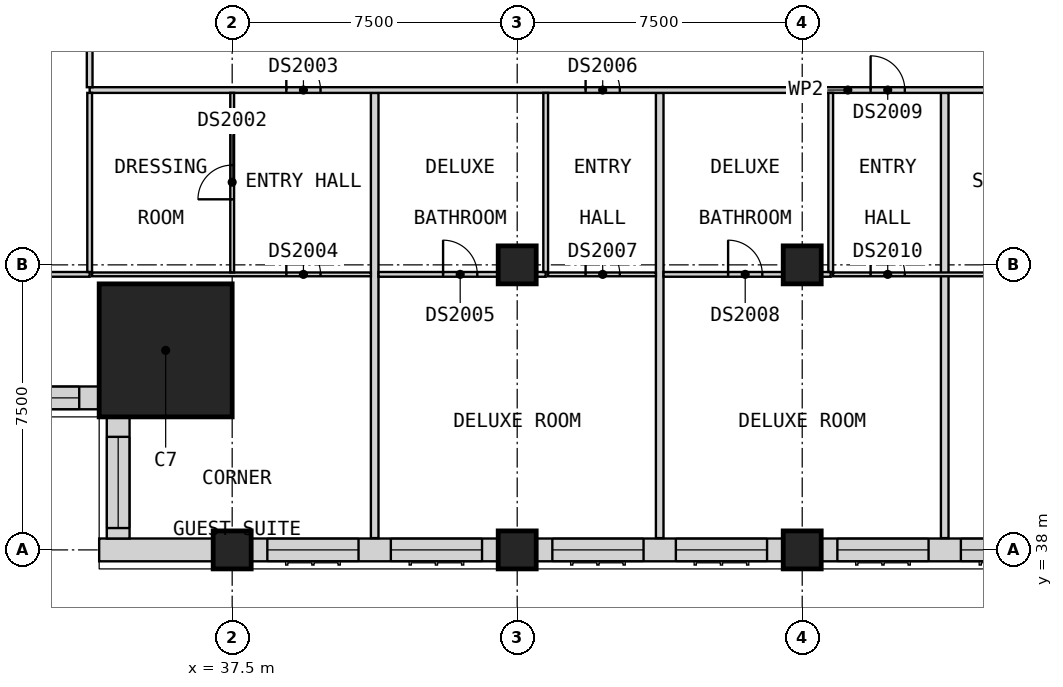
"""IFC4 building model, lengths in metres.
Left out: names, types, materials, properties, quantities, classifications, styles, units other than length and angle.
Written with IfcOpenShell. Run it as: python <this file> out.ifc"""

import sys

from ifc_helpers import new_model, si_unit, direction, frame, frame_2d, origin, origin_2d, place, context, subcontext, project, spatial, rectangle, extrude, element, fill, save


model = new_model("IFC4")
c1 = context("Model", 3, precision=1e-05, world=origin(), true_north=direction((0.0, 1.0)))
c2 = subcontext(c1, "Body", "Model", "MODEL_VIEW")
j1 = project(units=[si_unit("LENGTHUNIT", "METRE"), si_unit("PLANEANGLEUNIT", "RADIAN")], contexts=[c1])
p1 = place(None, origin())
s1 = spatial("IfcSite", under=j1, at=p1, CompositionType="ELEMENT")
p2 = place(p1, origin())
s2 = spatial("IfcBuilding", under=s1, at=p2, CompositionType="ELEMENT")
p3 = place(p2, frame((0.0, 0.0, 133.8)))
s3 = spatial("IfcBuildingStorey", under=s2, at=p3, CompositionType="ELEMENT", Elevation=133.8)
for number, where, z_axis, x_axis in (
    (1, (37.5, 38.0, 0.0), (0.0, 0.0, 1.0), (1.0, 0.0, 0.0)),
    (2, (45.0, 38.0, 0.0), (0.0, 0.0, 1.0), (1.0, 0.0, 0.0)),
    (3, (45.0, 45.5, 0.0), (0.0, 0.0, 1.0), (1.0, 0.0, 0.0)),
    (4, (52.5, 38.0, 0.0), (0.0, 0.0, 1.0), (1.0, 0.0, 0.0)),
    (5, (52.5, 45.5, 0.0), (0.0, 0.0, 1.0), (1.0, 0.0, 0.0)),
):
    element("IfcColumn", number, at=place(p3, frame(where, z_axis=z_axis, x_axis=x_axis)), inside=s3, PredefinedType="COLUMN", context=c2, shape_type="SweptSolid", body=[
        extrude(rectangle(XDim=1.0, YDim=1.0, at=origin_2d()), origin(), (0.0, 0.0, 1.0), 3.6),
    ])
p4 = place(p3, frame((35.75, 43.25, 0.0), z_axis=(0.0, 0.0, 1.0), x_axis=(1.0, 0.0, 0.0)))
e6 = element("IfcColumn", 6, at=p4, inside=s3, PredefinedType="COLUMN", context=c2, shape_type="SweptSolid", body=[
    extrude(rectangle(XDim=3.5, YDim=3.5, at=origin_2d()), origin(), (0.0, 0.0, 1.0), 3.6),
])
p5 = place(p3, frame((34.0, 38.0, 0.0), z_axis=(0.0, 0.0, 1.0), x_axis=(1.0, 0.0, 0.0)))
e7 = element("IfcWall", 7, at=p5, inside=s3, PredefinedType="SOLIDWALL", context=c2, shape_type="SweptSolid", body=[
    extrude(rectangle(XDim=3.0, YDim=0.6, at=frame_2d((1.5, 0.0))), origin(), (0.0, 0.0, 1.0), 3.35),
])
p6 = place(p3, frame((38.0, 38.0, 0.0), z_axis=(0.0, 0.0, 1.0), x_axis=(1.0, 0.0, 0.0)))
e8 = element("IfcWall", 8, at=p6, inside=s3, PredefinedType="SOLIDWALL", context=c2, shape_type="SweptSolid", body=[
    extrude(rectangle(XDim=6.5, YDim=0.6, at=frame_2d((3.25, 0.0))), origin(), (0.0, 0.0, 1.0), 2.85),
])
p7 = place(p6, frame((0.425, 0.0, 0.8)))
e9 = element("IfcOpeningElement", 9, at=p7, cuts=e8, PredefinedType="OPENING", context=c2, shape_type="SweptSolid", body=[
    extrude(rectangle(XDim=2.4, YDim=1.8, at=frame_2d((1.2, 0.9))), frame((0.0, 0.31, 0.0), z_axis=(0.0, -1.0, 0.0), x_axis=(1.0, 0.0, 0.0)), (0.0, 0.0, 1.0), 0.62),
])
p8 = place(p6, frame((3.675, 0.0, 0.8)))
e10 = element("IfcOpeningElement", 10, at=p8, cuts=e8, PredefinedType="OPENING", context=c2, shape_type="SweptSolid", body=[
    extrude(rectangle(XDim=2.4, YDim=1.8, at=frame_2d((1.2, 0.9))), frame((0.0, 0.31, 0.0), z_axis=(0.0, -1.0, 0.0), x_axis=(1.0, 0.0, 0.0)), (0.0, 0.0, 1.0), 0.62),
])
p9 = place(p3, frame((45.5, 38.0, 0.0), z_axis=(0.0, 0.0, 1.0), x_axis=(1.0, 0.0, 0.0)))
e11 = element("IfcWall", 11, at=p9, inside=s3, PredefinedType="SOLIDWALL", context=c2, shape_type="SweptSolid", body=[
    extrude(rectangle(XDim=6.5, YDim=0.6, at=frame_2d((3.25, 0.0))), origin(), (0.0, 0.0, 1.0), 2.85),
])
p10 = place(p9, frame((0.425, 0.0, 0.8)))
e12 = element("IfcOpeningElement", 12, at=p10, cuts=e11, PredefinedType="OPENING", context=c2, shape_type="SweptSolid", body=[
    extrude(rectangle(XDim=2.4, YDim=1.8, at=frame_2d((1.2, 0.9))), frame((0.0, 0.31, 0.0), z_axis=(0.0, -1.0, 0.0), x_axis=(1.0, 0.0, 0.0)), (0.0, 0.0, 1.0), 0.62),
])
p11 = place(p9, frame((3.675, 0.0, 0.8)))
e13 = element("IfcOpeningElement", 13, at=p11, cuts=e11, PredefinedType="OPENING", context=c2, shape_type="SweptSolid", body=[
    extrude(rectangle(XDim=2.4, YDim=1.8, at=frame_2d((1.2, 0.9))), frame((0.0, 0.31, 0.0), z_axis=(0.0, -1.0, 0.0), x_axis=(1.0, 0.0, 0.0)), (0.0, 0.0, 1.0), 0.62),
])
p12 = place(p3, frame((53.0, 38.0, 0.0), z_axis=(0.0, 0.0, 1.0), x_axis=(1.0, 0.0, 0.0)))
e14 = element("IfcWall", 14, at=p12, inside=s3, PredefinedType="SOLIDWALL", context=c2, shape_type="SweptSolid", body=[
    extrude(rectangle(XDim=6.5, YDim=0.6, at=frame_2d((3.25, 0.0))), origin(), (0.0, 0.0, 1.0), 2.85),
])
p13 = place(p12, frame((0.425, 0.0, 0.8)))
e15 = element("IfcOpeningElement", 15, at=p13, cuts=e14, PredefinedType="OPENING", context=c2, shape_type="SweptSolid", body=[
    extrude(rectangle(XDim=2.4, YDim=1.8, at=frame_2d((1.2, 0.9))), frame((0.0, 0.31, 0.0), z_axis=(0.0, -1.0, 0.0), x_axis=(1.0, 0.0, 0.0)), (0.0, 0.0, 1.0), 0.62),
])
p14 = place(p12, frame((3.675, 0.0, 0.8)))
e16 = element("IfcOpeningElement", 16, at=p14, cuts=e14, PredefinedType="OPENING", context=c2, shape_type="SweptSolid", body=[
    extrude(rectangle(XDim=2.4, YDim=1.8, at=frame_2d((1.2, 0.9))), frame((0.0, 0.31, 0.0), z_axis=(0.0, -1.0, 0.0), x_axis=(1.0, 0.0, 0.0)), (0.0, 0.0, 1.0), 0.62),
])
p15 = place(p3, frame((30.8, 42.0, 0.0), z_axis=(0.0, 0.0, 1.0), x_axis=(1.0, 0.0, 0.0)))
e17 = element("IfcWall", 17, at=p15, inside=s3, PredefinedType="SOLIDWALL", context=c2, shape_type="SweptSolid", body=[
    extrude(rectangle(XDim=3.2, YDim=0.6, at=frame_2d((1.6, 0.0))), origin(), (0.0, 0.0, 1.0), 3.35),
])
p16 = place(p15, frame((0.275, 0.0, 0.8)))
e18 = element("IfcOpeningElement", 18, at=p16, cuts=e17, PredefinedType="OPENING", context=c2, shape_type="SweptSolid", body=[
    extrude(rectangle(XDim=2.4, YDim=1.8, at=frame_2d((1.2, 0.9))), frame((0.0, 0.31, 0.0), z_axis=(0.0, -1.0, 0.0), x_axis=(1.0, 0.0, 0.0)), (0.0, 0.0, 1.0), 0.62),
])
p17 = place(p3, frame((34.5, 41.5, 0.0), z_axis=(0.0, 0.0, 1.0), x_axis=(0.0, -1.0, 0.0)))
e19 = element("IfcWall", 19, at=p17, inside=s3, PredefinedType="SOLIDWALL", context=c2, shape_type="SweptSolid", body=[
    extrude(rectangle(XDim=3.2, YDim=0.6, at=frame_2d((1.6, 0.0))), origin(), (0.0, 0.0, 1.0), 3.35),
])
p18 = place(p17, frame((0.525, 0.0, 0.8)))
e20 = element("IfcOpeningElement", 20, at=p18, cuts=e19, PredefinedType="OPENING", context=c2, shape_type="SweptSolid", body=[
    extrude(rectangle(XDim=2.4, YDim=1.8, at=frame_2d((1.2, 0.9))), frame((0.0, 0.31, 0.0), z_axis=(0.0, -1.0, 0.0), x_axis=(1.0, 0.0, 0.0)), (0.0, 0.0, 1.0), 0.62),
])
for number, where, z_axis, x_axis in (
    (21, (41.25, 38.31, 0.0), (0.0, 0.0, 1.0), (0.0, 1.0, 0.0)),
    (22, (48.75, 38.31, 0.0), (0.0, 0.0, 1.0), (0.0, 1.0, 0.0)),
    (23, (56.25, 38.31, 0.0), (0.0, 0.0, 1.0), (0.0, 1.0, 0.0)),
):
    element("IfcWall", number, at=place(p3, frame(where, z_axis=z_axis, x_axis=x_axis)), inside=s3, PredefinedType="PARTITIONING", context=c2, shape_type="SweptSolid", body=[
        extrude(rectangle(XDim=11.715, YDim=0.2, at=frame_2d((5.857, 0.0))), origin(), (0.0, 0.0, 1.0), 3.35),
    ])
p19 = place(p3, frame((33.75, 50.1, 0.0), z_axis=(0.0, 0.0, 1.0), x_axis=(1.0, 0.0, 0.0)))
e24 = element("IfcWall", 24, at=p19, inside=s3, PredefinedType="PARTITIONING", context=c2, shape_type="SweptSolid", body=[
    extrude(rectangle(XDim=39.9, YDim=0.15, at=frame_2d((19.95, 0.0))), origin(), (0.0, 0.0, 1.0), 3.35),
])
p20 = place(p19, frame((5.175, 0.0, 0.0)))
e25 = element("IfcOpeningElement", 25, at=p20, cuts=e24, PredefinedType="OPENING", context=c2, shape_type="SweptSolid", body=[
    extrude(rectangle(XDim=0.9, YDim=2.1, at=frame_2d((0.45, 1.05))), frame((0.0, 0.085, 0.0), z_axis=(0.0, -1.0, 0.0), x_axis=(1.0, 0.0, 0.0)), (0.0, 0.0, 1.0), 0.17),
])
p21 = place(p19, frame((13.05, 0.0, 0.0)))
e26 = element("IfcOpeningElement", 26, at=p21, cuts=e24, PredefinedType="OPENING", context=c2, shape_type="SweptSolid", body=[
    extrude(rectangle(XDim=0.9, YDim=2.1, at=frame_2d((0.45, 1.05))), frame((0.0, 0.085, 0.0), z_axis=(0.0, -1.0, 0.0), x_axis=(1.0, 0.0, 0.0)), (0.0, 0.0, 1.0), 0.17),
])
p22 = place(p19, frame((20.55, 0.0, 0.0)))
e27 = element("IfcOpeningElement", 27, at=p22, cuts=e24, PredefinedType="OPENING", context=c2, shape_type="SweptSolid", body=[
    extrude(rectangle(XDim=0.9, YDim=2.1, at=frame_2d((0.45, 1.05))), frame((0.0, 0.085, 0.0), z_axis=(0.0, -1.0, 0.0), x_axis=(1.0, 0.0, 0.0)), (0.0, 0.0, 1.0), 0.17),
])
p23 = place(p19, frame((24.3, 0.0, 0.0)))
e28 = element("IfcOpeningElement", 28, at=p23, cuts=e24, PredefinedType="OPENING", context=c2, shape_type="SweptSolid", body=[
    extrude(rectangle(XDim=0.9, YDim=2.1, at=frame_2d((0.45, 1.05))), frame((0.0, 0.085, 0.0), z_axis=(0.0, -1.0, 0.0), x_axis=(1.0, 0.0, 0.0)), (0.0, 0.0, 1.0), 0.17),
])
p24 = place(p19, frame((36.113, 0.0, 0.0)))
e29 = element("IfcOpeningElement", 29, at=p24, cuts=e24, PredefinedType="OPENING", context=c2, shape_type="SweptSolid", body=[
    extrude(rectangle(XDim=0.9, YDim=2.1, at=frame_2d((0.45, 1.05))), frame((0.0, 0.085, 0.0), z_axis=(0.0, -1.0, 0.0), x_axis=(1.0, 0.0, 0.0)), (0.0, 0.0, 1.0), 0.17),
])
p25 = place(p19, frame((38.25, 0.0, 0.0)))
e30 = element("IfcOpeningElement", 30, at=p25, cuts=e24, PredefinedType="OPENING", context=c2, shape_type="SweptSolid", body=[
    extrude(rectangle(XDim=0.9, YDim=2.1, at=frame_2d((0.45, 1.05))), frame((0.0, 0.085, 0.0), z_axis=(0.0, -1.0, 0.0), x_axis=(1.0, 0.0, 0.0)), (0.0, 0.0, 1.0), 0.17),
])
p26 = place(p3, frame((33.75, 50.175, 0.0), z_axis=(0.0, 0.0, 1.0), x_axis=(0.0, 1.0, 0.0)))
e31 = element("IfcWall", 31, at=p26, inside=s3, PredefinedType="PARTITIONING", context=c2, shape_type="SweptSolid", body=[
    extrude(rectangle(XDim=2.225, YDim=0.15, at=frame_2d((1.112, 0.0))), origin(), (0.0, 0.0, 1.0), 3.35),
])
p27 = place(p3, frame((33.812, 45.25, 0.0), z_axis=(0.0, 0.0, 1.0), x_axis=(1.0, 0.0, 0.0)))
e32 = element("IfcWall", 32, at=p27, inside=s3, PredefinedType="PARTITIONING", context=c2, shape_type="SweptSolid", body=[
    extrude(rectangle(XDim=7.337, YDim=0.1, at=frame_2d((3.669, 0.0))), origin(), (0.0, 0.0, 1.0), 3.35),
])
p28 = place(p27, frame((5.113, 0.0, 0.0)))
e33 = element("IfcOpeningElement", 33, at=p28, cuts=e32, PredefinedType="OPENING", context=c2, shape_type="SweptSolid", body=[
    extrude(rectangle(XDim=0.9, YDim=2.1, at=frame_2d((0.45, 1.05))), frame((0.0, 0.06, 0.0), z_axis=(0.0, -1.0, 0.0), x_axis=(1.0, 0.0, 0.0)), (0.0, 0.0, 1.0), 0.12),
])
p29 = place(p3, frame((45.812, 45.25, 0.0), z_axis=(0.0, 0.0, 1.0), x_axis=(1.0, 0.0, 0.0)))
e34 = element("IfcWall", 34, at=p29, inside=s3, PredefinedType="PARTITIONING", context=c2, shape_type="SweptSolid", body=[
    extrude(rectangle(XDim=2.837, YDim=0.1, at=frame_2d((1.419, 0.0))), origin(), (0.0, 0.0, 1.0), 3.35),
])
p30 = place(p29, frame((0.988, 0.0, 0.0)))
e35 = element("IfcOpeningElement", 35, at=p30, cuts=e34, PredefinedType="OPENING", context=c2, shape_type="SweptSolid", body=[
    extrude(rectangle(XDim=0.9, YDim=2.1, at=frame_2d((0.45, 1.05))), frame((0.0, 0.06, 0.0), z_axis=(0.0, -1.0, 0.0), x_axis=(1.0, 0.0, 0.0)), (0.0, 0.0, 1.0), 0.12),
])
p31 = place(p3, frame((53.312, 45.25, 0.0), z_axis=(0.0, 0.0, 1.0), x_axis=(1.0, 0.0, 0.0)))
e36 = element("IfcWall", 36, at=p31, inside=s3, PredefinedType="PARTITIONING", context=c2, shape_type="SweptSolid", body=[
    extrude(rectangle(XDim=7.375, YDim=0.1, at=frame_2d((3.688, 0.0))), origin(), (0.0, 0.0, 1.0), 3.35),
])
p32 = place(p31, frame((0.988, 0.0, 0.0)))
e37 = element("IfcOpeningElement", 37, at=p32, cuts=e36, PredefinedType="OPENING", context=c2, shape_type="SweptSolid", body=[
    extrude(rectangle(XDim=0.9, YDim=2.1, at=frame_2d((0.45, 1.05))), frame((0.0, 0.06, 0.0), z_axis=(0.0, -1.0, 0.0), x_axis=(1.0, 0.0, 0.0)), (0.0, 0.0, 1.0), 0.12),
])
p33 = place(p31, frame((4.738, 0.0, 0.0)))
e38 = element("IfcOpeningElement", 38, at=p33, cuts=e36, PredefinedType="OPENING", context=c2, shape_type="SweptSolid", body=[
    extrude(rectangle(XDim=0.9, YDim=2.1, at=frame_2d((0.45, 1.05))), frame((0.0, 0.06, 0.0), z_axis=(0.0, -1.0, 0.0), x_axis=(1.0, 0.0, 0.0)), (0.0, 0.0, 1.0), 0.12),
])
p34 = place(p3, frame((37.5, 45.3, 0.0), z_axis=(0.0, 0.0, 1.0), x_axis=(0.0, 1.0, 0.0)))
e39 = element("IfcWall", 39, at=p34, inside=s3, PredefinedType="PARTITIONING", context=c2, shape_type="SweptSolid", body=[
    extrude(rectangle(XDim=4.725, YDim=0.1, at=frame_2d((2.362, 0.0))), origin(), (0.0, 0.0, 1.0), 3.35),
])
p35 = place(p34, frame((1.925, 0.0, 0.0)))
e40 = element("IfcOpeningElement", 40, at=p35, cuts=e39, PredefinedType="OPENING", context=c2, shape_type="SweptSolid", body=[
    extrude(rectangle(XDim=0.9, YDim=2.1, at=frame_2d((0.45, 1.05))), frame((0.0, 0.06, 0.0), z_axis=(0.0, -1.0, 0.0), x_axis=(1.0, 0.0, 0.0)), (0.0, 0.0, 1.0), 0.12),
])
p36 = place(p3, frame((30.0, 45.25, 0.0), z_axis=(0.0, 0.0, 1.0), x_axis=(1.0, 0.0, 0.0)))
e41 = element("IfcWall", 41, at=p36, inside=s3, PredefinedType="PARTITIONING", context=c2, shape_type="SweptSolid", body=[
    extrude(rectangle(XDim=3.75, YDim=0.125, at=frame_2d((1.875, 0.0))), origin(), (0.0, 0.0, 1.0), 3.35),
])
p37 = place(p36, frame((1.425, 0.0, 0.0)))
e42 = element("IfcOpeningElement", 42, at=p37, cuts=e41, PredefinedType="OPENING", context=c2, shape_type="SweptSolid", body=[
    extrude(rectangle(XDim=0.9, YDim=2.1, at=frame_2d((0.45, 1.05))), frame((0.0, 0.073, 0.0), z_axis=(0.0, -1.0, 0.0), x_axis=(1.0, 0.0, 0.0)), (0.0, 0.0, 1.0), 0.145),
])
p38 = place(p3, frame((41.35, 45.25, 0.0), z_axis=(0.0, 0.0, 1.0), x_axis=(1.0, 0.0, 0.0)))
e43 = element("IfcWall", 43, at=p38, inside=s3, PredefinedType="PARTITIONING", context=c2, shape_type="SweptSolid", body=[
    extrude(rectangle(XDim=4.4, YDim=0.125, at=frame_2d((2.2, 0.0))), origin(), (0.0, 0.0, 1.0), 3.35),
])
p39 = place(p38, frame((1.7, 0.0, 0.0)))
e44 = element("IfcOpeningElement", 44, at=p39, cuts=e43, PredefinedType="OPENING", context=c2, shape_type="SweptSolid", body=[
    extrude(rectangle(XDim=0.9, YDim=2.1, at=frame_2d((0.45, 1.05))), frame((0.0, 0.073, 0.0), z_axis=(0.0, -1.0, 0.0), x_axis=(1.0, 0.0, 0.0)), (0.0, 0.0, 1.0), 0.145),
])
p40 = place(p3, frame((48.85, 45.25, 0.0), z_axis=(0.0, 0.0, 1.0), x_axis=(1.0, 0.0, 0.0)))
e45 = element("IfcWall", 45, at=p40, inside=s3, PredefinedType="PARTITIONING", context=c2, shape_type="SweptSolid", body=[
    extrude(rectangle(XDim=4.4, YDim=0.125, at=frame_2d((2.2, 0.0))), origin(), (0.0, 0.0, 1.0), 3.35),
])
p41 = place(p40, frame((1.7, 0.0, 0.0)))
e46 = element("IfcOpeningElement", 46, at=p41, cuts=e45, PredefinedType="OPENING", context=c2, shape_type="SweptSolid", body=[
    extrude(rectangle(XDim=0.9, YDim=2.1, at=frame_2d((0.45, 1.05))), frame((0.0, 0.073, 0.0), z_axis=(0.0, -1.0, 0.0), x_axis=(1.0, 0.0, 0.0)), (0.0, 0.0, 1.0), 0.145),
])
for number, where, z_axis, x_axis in (
    (47, (33.75, 45.312, 0.0), (0.0, 0.0, 1.0), (0.0, 1.0, 0.0)),
    (48, (45.75, 45.312, 0.0), (0.0, 0.0, 1.0), (0.0, 1.0, 0.0)),
    (49, (53.25, 45.312, 0.0), (0.0, 0.0, 1.0), (0.0, 1.0, 0.0)),
):
    element("IfcWall", number, at=place(p3, frame(where, z_axis=z_axis, x_axis=x_axis)), inside=s3, PredefinedType="PARTITIONING", context=c2, shape_type="SweptSolid", body=[
        extrude(rectangle(XDim=4.712, YDim=0.125, at=frame_2d((2.356, 0.0))), origin(), (0.0, 0.0, 1.0), 3.35),
    ])
p42 = place(p7, origin())
e50 = element("IfcWindow", 50, at=p42, inside=s3, PartitioningType="SINGLE_PANEL", PredefinedType="WINDOW", context=c2, shape_type="SweptSolid", body=[
    extrude(rectangle(XDim=2.4, YDim=1.8, at=frame_2d((1.2, 0.9))), frame((0.0, -0.07, 0.0), z_axis=(0.0, -1.0, 0.0), x_axis=(1.0, 0.0, 0.0)), (0.0, 0.0, 1.0), 0.06),
])
fill(e9, e50)
p43 = place(p8, origin())
e51 = element("IfcWindow", 51, at=p43, inside=s3, PartitioningType="SINGLE_PANEL", PredefinedType="WINDOW", context=c2, shape_type="SweptSolid", body=[
    extrude(rectangle(XDim=2.4, YDim=1.8, at=frame_2d((1.2, 0.9))), frame((0.0, -0.07, 0.0), z_axis=(0.0, -1.0, 0.0), x_axis=(1.0, 0.0, 0.0)), (0.0, 0.0, 1.0), 0.06),
])
fill(e10, e51)
p44 = place(p10, origin())
e52 = element("IfcWindow", 52, at=p44, inside=s3, PartitioningType="SINGLE_PANEL", PredefinedType="WINDOW", context=c2, shape_type="SweptSolid", body=[
    extrude(rectangle(XDim=2.4, YDim=1.8, at=frame_2d((1.2, 0.9))), frame((0.0, -0.07, 0.0), z_axis=(0.0, -1.0, 0.0), x_axis=(1.0, 0.0, 0.0)), (0.0, 0.0, 1.0), 0.06),
])
fill(e12, e52)
p45 = place(p11, origin())
e53 = element("IfcWindow", 53, at=p45, inside=s3, PartitioningType="SINGLE_PANEL", PredefinedType="WINDOW", context=c2, shape_type="SweptSolid", body=[
    extrude(rectangle(XDim=2.4, YDim=1.8, at=frame_2d((1.2, 0.9))), frame((0.0, -0.07, 0.0), z_axis=(0.0, -1.0, 0.0), x_axis=(1.0, 0.0, 0.0)), (0.0, 0.0, 1.0), 0.06),
])
fill(e13, e53)
p46 = place(p13, origin())
e54 = element("IfcWindow", 54, at=p46, inside=s3, PartitioningType="SINGLE_PANEL", PredefinedType="WINDOW", context=c2, shape_type="SweptSolid", body=[
    extrude(rectangle(XDim=2.4, YDim=1.8, at=frame_2d((1.2, 0.9))), frame((0.0, -0.07, 0.0), z_axis=(0.0, -1.0, 0.0), x_axis=(1.0, 0.0, 0.0)), (0.0, 0.0, 1.0), 0.06),
])
fill(e15, e54)
p47 = place(p14, origin())
e55 = element("IfcWindow", 55, at=p47, inside=s3, PartitioningType="SINGLE_PANEL", PredefinedType="WINDOW", context=c2, shape_type="SweptSolid", body=[
    extrude(rectangle(XDim=2.4, YDim=1.8, at=frame_2d((1.2, 0.9))), frame((0.0, -0.07, 0.0), z_axis=(0.0, -1.0, 0.0), x_axis=(1.0, 0.0, 0.0)), (0.0, 0.0, 1.0), 0.06),
])
fill(e16, e55)
p48 = place(p16, origin())
e56 = element("IfcWindow", 56, at=p48, inside=s3, PartitioningType="SINGLE_PANEL", PredefinedType="WINDOW", context=c2, shape_type="SweptSolid", body=[
    extrude(rectangle(XDim=2.4, YDim=1.8, at=frame_2d((1.2, 0.9))), frame((0.0, -0.07, 0.0), z_axis=(0.0, -1.0, 0.0), x_axis=(1.0, 0.0, 0.0)), (0.0, 0.0, 1.0), 0.06),
])
fill(e18, e56)
p49 = place(p18, origin())
e57 = element("IfcWindow", 57, at=p49, inside=s3, PartitioningType="SINGLE_PANEL", PredefinedType="WINDOW", context=c2, shape_type="SweptSolid", body=[
    extrude(rectangle(XDim=2.4, YDim=1.8, at=frame_2d((1.2, 0.9))), frame((0.0, -0.07, 0.0), z_axis=(0.0, -1.0, 0.0), x_axis=(1.0, 0.0, 0.0)), (0.0, 0.0, 1.0), 0.06),
])
fill(e20, e57)
p50 = place(p35, origin())
e58 = element("IfcDoor", 58, at=p50, inside=s3, OperationType="SINGLE_SWING_RIGHT", PredefinedType="DOOR", context=c2, shape_type="SweptSolid", body=[
    extrude(rectangle(XDim=0.9, YDim=2.1, at=frame_2d((0.45, 1.05))), frame((0.0, 0.025, 0.0), z_axis=(0.0, -1.0, 0.0), x_axis=(1.0, 0.0, 0.0)), (0.0, 0.0, 1.0), 0.05),
])
fill(e40, e58)
p51 = place(p20, origin())
e59 = element("IfcDoor", 59, at=p51, inside=s3, OperationType="SINGLE_SWING_RIGHT", PredefinedType="DOOR", context=c2, shape_type="SweptSolid", body=[
    extrude(rectangle(XDim=0.9, YDim=2.1, at=frame_2d((0.45, 1.05))), frame((0.0, 0.025, 0.0), z_axis=(0.0, -1.0, 0.0), x_axis=(1.0, 0.0, 0.0)), (0.0, 0.0, 1.0), 0.05),
])
fill(e25, e59)
p52 = place(p28, origin())
e60 = element("IfcDoor", 60, at=p52, inside=s3, OperationType="SINGLE_SWING_LEFT", PredefinedType="DOOR", context=c2, shape_type="SweptSolid", body=[
    extrude(rectangle(XDim=0.9, YDim=2.1, at=frame_2d((0.45, 1.05))), frame((0.0, 0.025, 0.0), z_axis=(0.0, -1.0, 0.0), x_axis=(1.0, 0.0, 0.0)), (0.0, 0.0, 1.0), 0.05),
])
fill(e33, e60)
p53 = place(p39, origin())
e61 = element("IfcDoor", 61, at=p53, inside=s3, OperationType="SINGLE_SWING_LEFT", PredefinedType="DOOR", context=c2, shape_type="SweptSolid", body=[
    extrude(rectangle(XDim=0.9, YDim=2.1, at=frame_2d((0.45, 1.05))), frame((0.0, 0.025, 0.0), z_axis=(0.0, -1.0, 0.0), x_axis=(1.0, 0.0, 0.0)), (0.0, 0.0, 1.0), 0.05),
])
fill(e44, e61)
p54 = place(p21, origin())
e62 = element("IfcDoor", 62, at=p54, inside=s3, OperationType="SINGLE_SWING_RIGHT", PredefinedType="DOOR", context=c2, shape_type="SweptSolid", body=[
    extrude(rectangle(XDim=0.9, YDim=2.1, at=frame_2d((0.45, 1.05))), frame((0.0, 0.025, 0.0), z_axis=(0.0, -1.0, 0.0), x_axis=(1.0, 0.0, 0.0)), (0.0, 0.0, 1.0), 0.05),
])
fill(e26, e62)
p55 = place(p30, origin())
e63 = element("IfcDoor", 63, at=p55, inside=s3, OperationType="SINGLE_SWING_LEFT", PredefinedType="DOOR", context=c2, shape_type="SweptSolid", body=[
    extrude(rectangle(XDim=0.9, YDim=2.1, at=frame_2d((0.45, 1.05))), frame((0.0, 0.025, 0.0), z_axis=(0.0, -1.0, 0.0), x_axis=(1.0, 0.0, 0.0)), (0.0, 0.0, 1.0), 0.05),
])
fill(e35, e63)
p56 = place(p41, origin())
e64 = element("IfcDoor", 64, at=p56, inside=s3, OperationType="SINGLE_SWING_LEFT", PredefinedType="DOOR", context=c2, shape_type="SweptSolid", body=[
    extrude(rectangle(XDim=0.9, YDim=2.1, at=frame_2d((0.45, 1.05))), frame((0.0, 0.025, 0.0), z_axis=(0.0, -1.0, 0.0), x_axis=(1.0, 0.0, 0.0)), (0.0, 0.0, 1.0), 0.05),
])
fill(e46, e64)
p57 = place(p22, origin())
e65 = element("IfcDoor", 65, at=p57, inside=s3, OperationType="SINGLE_SWING_RIGHT", PredefinedType="DOOR", context=c2, shape_type="SweptSolid", body=[
    extrude(rectangle(XDim=0.9, YDim=2.1, at=frame_2d((0.45, 1.05))), frame((0.0, 0.025, 0.0), z_axis=(0.0, -1.0, 0.0), x_axis=(1.0, 0.0, 0.0)), (0.0, 0.0, 1.0), 0.05),
])
fill(e27, e65)
p58 = place(p32, origin())
e66 = element("IfcDoor", 66, at=p58, inside=s3, OperationType="SINGLE_SWING_LEFT", PredefinedType="DOOR", context=c2, shape_type="SweptSolid", body=[
    extrude(rectangle(XDim=0.9, YDim=2.1, at=frame_2d((0.45, 1.05))), frame((0.0, 0.025, 0.0), z_axis=(0.0, -1.0, 0.0), x_axis=(1.0, 0.0, 0.0)), (0.0, 0.0, 1.0), 0.05),
])
fill(e37, e66)
save(model, sys.argv[1])
